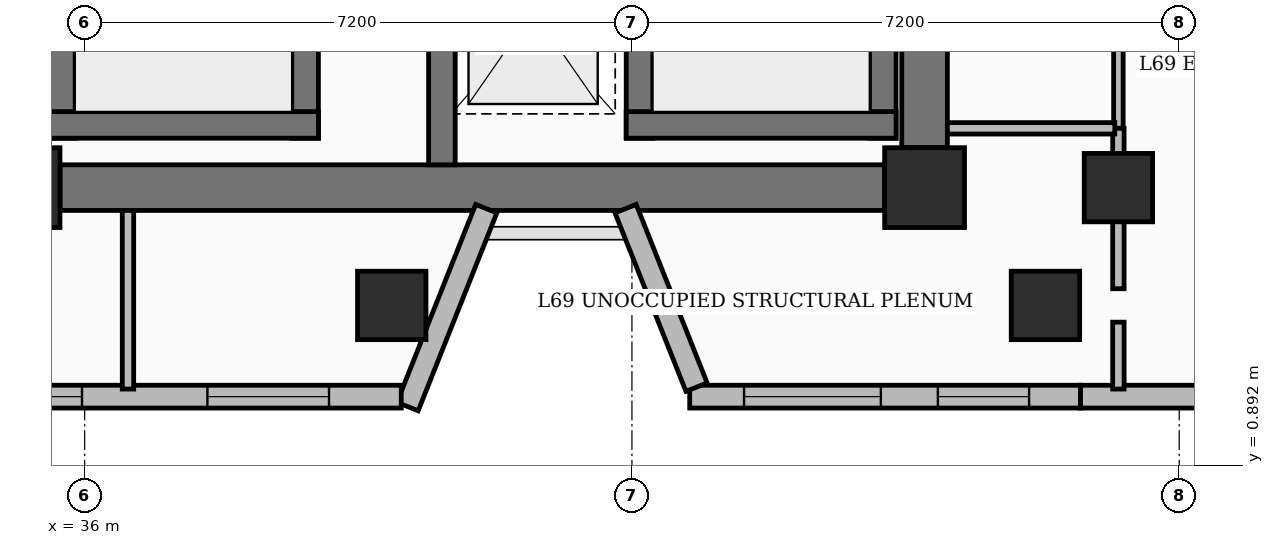
"""IFC4 building model, lengths in metres.
Left out: names, types, materials, properties, quantities, classifications, styles, units other than length and angle.
Written with IfcOpenShell. Run it as: python <this file> out.ifc"""

import sys

from ifc_helpers import new_model, si_unit, direction, frame, frame_2d, origin, origin_2d, place, context, subcontext, project, spatial, rectangle, extrude, element, fill, save


model = new_model("IFC4")
c1 = context("Model", 3, precision=1e-05, world=origin(), true_north=direction((0.0, 1.0)))
c2 = subcontext(c1, "Body", "Model", "MODEL_VIEW")
j1 = project(units=[si_unit("LENGTHUNIT", "METRE"), si_unit("PLANEANGLEUNIT", "RADIAN")], contexts=[c1])
p1 = place(None, origin())
s1 = spatial("IfcSite", under=j1, at=p1, CompositionType="ELEMENT")
p2 = place(p1, origin())
s2 = spatial("IfcBuilding", under=s1, at=p2, CompositionType="ELEMENT")
p3 = place(p2, frame((0.0, 0.0, 267.0)))
s3 = spatial("IfcBuildingStorey", under=s2, at=p3, CompositionType="ELEMENT", Elevation=267.0)
for number, where, z_axis, x_axis in (
    (1, (35.15, 4.55, 0.0), (0.0, 0.0, 1.0), (1.0, 0.0, 0.0)),
    (2, (47.05, 4.55, 0.0), (0.0, 0.0, 1.0), (1.0, 0.0, 0.0)),
):
    element("IfcColumn", number, at=place(p3, frame(where, z_axis=z_axis, x_axis=x_axis)), inside=s3, PredefinedType="COLUMN", context=c2, shape_type="SweptSolid", body=[
        extrude(rectangle(XDim=1.05, YDim=1.05, at=origin_2d()), origin(), (0.0, 0.0, 1.0), 3.75),
    ])
p4 = place(p3, frame((49.6, 4.55, 0.0), z_axis=(0.0, 0.0, 1.0), x_axis=(1.0, 0.0, 0.0)))
e3 = element("IfcColumn", 3, at=p4, inside=s3, PredefinedType="COLUMN", context=c2, shape_type="SweptSolid", body=[
    extrude(rectangle(XDim=0.9, YDim=0.9, at=origin_2d()), origin(), (0.0, 0.0, 1.0), 3.75),
])
p5 = place(p3, frame((35.675, 4.55, 0.0), z_axis=(0.0, 0.0, 1.0), x_axis=(1.0, 0.0, 0.0)))
e4 = element("IfcWall", 4, at=p5, inside=s3, PredefinedType="SHEAR", context=c2, shape_type="SweptSolid", body=[
    extrude(rectangle(XDim=10.85, YDim=0.6, at=frame_2d((5.425, 0.0))), origin(), (0.0, 0.0, 1.0), 3.75),
])
p6 = place(p3, frame((47.05, 5.075, 0.0), z_axis=(0.0, 0.0, 1.0), x_axis=(0.0, 1.0, 0.0)))
e5 = element("IfcWall", 5, at=p6, inside=s3, PredefinedType="SHEAR", context=c2, shape_type="SweptSolid", body=[
    extrude(rectangle(XDim=9.15, YDim=0.6, at=frame_2d((4.575, 0.0))), origin(), (0.0, 0.0, 1.0), 3.75),
])
p7 = place(p3, frame((35.7, 5.2, 0.0), z_axis=(0.0, 0.0, 1.0), x_axis=(0.0, 1.0, 0.0)))
e6 = element("IfcWall", 6, at=p7, inside=s3, PredefinedType="SOLIDWALL", context=c2, shape_type="SweptSolid", body=[
    extrude(rectangle(XDim=9.25, YDim=0.35, at=frame_2d((4.625, 0.0))), origin(), (0.0, 0.0, 1.0), 3.75),
])
p8 = place(p7, frame((6.02, 0.0, 0.0)))
e7 = element("IfcOpeningElement", 7, at=p8, cuts=e6, PredefinedType="OPENING", context=c2, shape_type="SweptSolid", body=[
    extrude(rectangle(XDim=1.0, YDim=2.15, at=frame_2d((0.5, 1.075))), frame((0.0, 0.185, 0.0), z_axis=(0.0, -1.0, 0.0), x_axis=(1.0, 0.0, 0.0)), (0.0, 0.0, 1.0), 0.37),
])
p9 = place(p3, frame((38.9, 5.2, 0.0), z_axis=(0.0, 0.0, 1.0), x_axis=(0.0, 1.0, 0.0)))
e8 = element("IfcWall", 8, at=p9, inside=s3, PredefinedType="SOLIDWALL", context=c2, shape_type="SweptSolid", body=[
    extrude(rectangle(XDim=9.25, YDim=0.35, at=frame_2d((4.625, 0.0))), origin(), (0.0, 0.0, 1.0), 3.75),
])
p10 = place(p9, frame((6.02, 0.0, 0.0)))
e9 = element("IfcOpeningElement", 9, at=p10, cuts=e8, PredefinedType="OPENING", context=c2, shape_type="SweptSolid", body=[
    extrude(rectangle(XDim=1.0, YDim=2.15, at=frame_2d((0.5, 1.075))), frame((0.0, 0.185, 0.0), z_axis=(0.0, -1.0, 0.0), x_axis=(1.0, 0.0, 0.0)), (0.0, 0.0, 1.0), 0.37),
])
p11 = place(p3, frame((35.525, 5.375, 0.0), z_axis=(0.0, 0.0, 1.0), x_axis=(1.0, 0.0, 0.0)))
e10 = element("IfcWall", 10, at=p11, inside=s3, PredefinedType="SOLIDWALL", context=c2, shape_type="SweptSolid", body=[
    extrude(rectangle(XDim=3.55, YDim=0.35, at=frame_2d((1.775, 0.0))), origin(), (0.0, 0.0, 1.0), 3.75),
])
p12 = place(p3, frame((43.3, 5.2, 0.0), z_axis=(0.0, 0.0, 1.0), x_axis=(0.0, 1.0, 0.0)))
e11 = element("IfcWall", 11, at=p12, inside=s3, PredefinedType="SOLIDWALL", context=c2, shape_type="SweptSolid", body=[
    extrude(rectangle(XDim=9.25, YDim=0.35, at=frame_2d((4.625, 0.0))), origin(), (0.0, 0.0, 1.0), 3.75),
])
p13 = place(p12, frame((6.02, 0.0, 0.0)))
e12 = element("IfcOpeningElement", 12, at=p13, cuts=e11, PredefinedType="OPENING", context=c2, shape_type="SweptSolid", body=[
    extrude(rectangle(XDim=1.0, YDim=2.15, at=frame_2d((0.5, 1.075))), frame((0.0, 0.185, 0.0), z_axis=(0.0, -1.0, 0.0), x_axis=(1.0, 0.0, 0.0)), (0.0, 0.0, 1.0), 0.37),
])
p14 = place(p3, frame((46.5, 5.2, 0.0), z_axis=(0.0, 0.0, 1.0), x_axis=(0.0, 1.0, 0.0)))
e13 = element("IfcWall", 13, at=p14, inside=s3, PredefinedType="SOLIDWALL", context=c2, shape_type="SweptSolid", body=[
    extrude(rectangle(XDim=9.25, YDim=0.35, at=frame_2d((4.625, 0.0))), origin(), (0.0, 0.0, 1.0), 3.75),
])
p15 = place(p3, frame((43.125, 5.375, 0.0), z_axis=(0.0, 0.0, 1.0), x_axis=(1.0, 0.0, 0.0)))
e14 = element("IfcWall", 14, at=p15, inside=s3, PredefinedType="SOLIDWALL", context=c2, shape_type="SweptSolid", body=[
    extrude(rectangle(XDim=3.55, YDim=0.35, at=frame_2d((1.775, 0.0))), origin(), (0.0, 0.0, 1.0), 3.75),
])
p16 = place(p3, frame((40.7, 4.85, 0.0), z_axis=(0.0, 0.0, 1.0), x_axis=(0.0, 1.0, 0.0)))
e15 = element("IfcWall", 15, at=p16, inside=s3, PredefinedType="SOLIDWALL", context=c2, shape_type="SweptSolid", body=[
    extrude(rectangle(XDim=3.075, YDim=0.35, at=frame_2d((1.538, 0.0))), origin(), (0.0, 0.0, 1.0), 3.75),
])
for number, where, z_axis, x_axis in (
    (16, (40.04, 3.0, 0.0), (0.0, 0.0, 1.0), (1.0, 0.0, 0.0)),
    (17, (48.64, 3.0, 0.0), (0.0, 0.0, 1.0), (1.0, 0.0, 0.0)),
):
    element("IfcColumn", number, at=place(p3, frame(where, z_axis=z_axis, x_axis=x_axis)), inside=s3, PredefinedType="COLUMN", context=c2, shape_type="SweptSolid", body=[
        extrude(rectangle(XDim=0.9, YDim=0.9, at=origin_2d()), origin(), (0.0, 0.0, 1.0), 3.75),
    ])
p17 = place(p3, frame((53.68, 1.8, 0.0), z_axis=(0.0, 0.0, 1.0), x_axis=(-1.0, 0.0, 0.0)))
e18 = element("IfcWall", 18, at=p17, inside=s3, PredefinedType="SOLIDWALL", context=c2, shape_type="SweptSolid", body=[
    extrude(rectangle(XDim=4.58, YDim=0.3, at=frame_2d((2.29, 0.0))), origin(), (0.0, 0.0, 1.0), 3.5),
])
p18 = place(p17, frame((1.615, 0.0, 0.8)))
e19 = element("IfcOpeningElement", 19, at=p18, cuts=e18, PredefinedType="OPENING", context=c2, shape_type="SweptSolid", body=[
    extrude(rectangle(XDim=1.2, YDim=1.8, at=frame_2d((0.6, 0.9))), frame((0.0, 0.16, 0.0), z_axis=(0.0, -1.0, 0.0), x_axis=(1.0, 0.0, 0.0)), (0.0, 0.0, 1.0), 0.32),
])
p19 = place(p3, frame((49.1, 1.8, 0.0), z_axis=(0.0, 0.0, 1.0), x_axis=(-1.0, 0.0, 0.0)))
e20 = element("IfcWall", 20, at=p19, inside=s3, PredefinedType="SOLIDWALL", context=c2, shape_type="SweptSolid", body=[
    extrude(rectangle(XDim=5.14, YDim=0.3, at=frame_2d((2.57, 0.0))), origin(), (0.0, 0.0, 1.0), 3.5),
])
p20 = place(p19, frame((2.625, 0.0, 0.6)))
e21 = element("IfcOpeningElement", 21, at=p20, cuts=e20, PredefinedType="OPENING", context=c2, shape_type="SweptSolid", body=[
    extrude(rectangle(XDim=1.8, YDim=2.1, at=frame_2d((0.9, 1.05))), frame((0.0, 0.16, 0.0), z_axis=(0.0, -1.0, 0.0), x_axis=(1.0, 0.0, 0.0)), (0.0, 0.0, 1.0), 0.32),
])
p21 = place(p19, frame((0.675, 0.0, 0.8)))
e22 = element("IfcOpeningElement", 22, at=p21, cuts=e20, PredefinedType="OPENING", context=c2, shape_type="SweptSolid", body=[
    extrude(rectangle(XDim=1.2, YDim=1.8, at=frame_2d((0.6, 0.9))), frame((0.0, 0.16, 0.0), z_axis=(0.0, -1.0, 0.0), x_axis=(1.0, 0.0, 0.0)), (0.0, 0.0, 1.0), 0.32),
])
p22 = place(p3, frame((44.05, 1.925, 0.0), z_axis=(0.0, 0.0, 1.0), x_axis=(-0.369457562636, 0.929247603931, 0.0)))
e23 = element("IfcWall", 23, at=p22, inside=s3, PredefinedType="SOLIDWALL", context=c2, shape_type="SweptSolid", body=[
    extrude(rectangle(XDim=2.527, YDim=0.3, at=frame_2d((1.263, 0.0))), origin(), (0.0, 0.0, 1.0), 2.3),
])
p23 = place(p3, frame((41.284, 4.273, 0.0), z_axis=(0.0, 0.0, 1.0), x_axis=(-0.369542065233, -0.929214002275, 0.0)))
e24 = element("IfcWall", 24, at=p23, inside=s3, PredefinedType="SOLIDWALL", context=c2, shape_type="SweptSolid", body=[
    extrude(rectangle(XDim=2.802, YDim=0.3, at=frame_2d((1.401, 0.0))), origin(), (0.0, 0.0, 1.0), 2.3),
])
p24 = place(p3, frame((40.165, 1.8, 0.0), z_axis=(0.0, 0.0, 1.0), x_axis=(-1.0, 0.0, 0.0)))
e25 = element("IfcWall", 25, at=p24, inside=s3, PredefinedType="SOLIDWALL", context=c2, shape_type="SweptSolid", body=[
    extrude(rectangle(XDim=6.885, YDim=0.3, at=frame_2d((3.442, 0.0))), origin(), (0.0, 0.0, 1.0), 3.5),
])
p25 = place(p24, frame((4.2, 0.0, 0.55)))
e26 = element("IfcOpeningElement", 26, at=p25, cuts=e25, PredefinedType="OPENING", context=c2, shape_type="SweptSolid", body=[
    extrude(rectangle(XDim=1.6, YDim=2.2, at=frame_2d((0.8, 1.1))), frame((0.0, 0.16, 0.0), z_axis=(0.0, -1.0, 0.0), x_axis=(1.0, 0.0, 0.0)), (0.0, 0.0, 1.0), 0.32),
])
p26 = place(p24, frame((0.95, 0.0, 0.55)))
e27 = element("IfcOpeningElement", 27, at=p26, cuts=e25, PredefinedType="OPENING", context=c2, shape_type="SweptSolid", body=[
    extrude(rectangle(XDim=1.6, YDim=2.2, at=frame_2d((0.8, 1.1))), frame((0.0, 0.16, 0.0), z_axis=(0.0, -1.0, 0.0), x_axis=(1.0, 0.0, 0.0)), (0.0, 0.0, 1.0), 0.32),
])
p27 = place(p3, frame((36.57, 1.9, 0.0), z_axis=(0.0, 0.0, 1.0), x_axis=(0.0, 1.0, 0.0)))
e28 = element("IfcWall", 28, at=p27, inside=s3, PredefinedType="PARTITIONING", context=c2, shape_type="SweptSolid", body=[
    extrude(rectangle(XDim=2.35, YDim=0.15, at=frame_2d((1.175, 0.0))), origin(), (0.0, 0.0, 1.0), 1.27),
])
p28 = place(p3, frame((49.6, 9.98, 0.0), z_axis=(0.0, 0.0, 1.0), x_axis=(0.0, -1.0, 0.0)))
e29 = element("IfcWall", 29, at=p28, inside=s3, PredefinedType="PARTITIONING", context=c2, shape_type="SweptSolid", body=[
    extrude(rectangle(XDim=4.65, YDim=0.125, at=frame_2d((2.325, 0.0))), origin(), (0.0, 0.0, 1.0), 1.27),
])
p29 = place(p3, frame((49.6, 2.78, 0.0), z_axis=(0.0, 0.0, 1.0), x_axis=(0.0, -1.0, 0.0)))
e30 = element("IfcWall", 30, at=p29, inside=s3, PredefinedType="PARTITIONING", context=c2, shape_type="SweptSolid", body=[
    extrude(rectangle(XDim=0.88, YDim=0.15, at=frame_2d((0.44, 0.0))), origin(), (0.0, 0.0, 1.0), 3.5),
])
p30 = place(p3, frame((49.6, 5.33, 0.0), z_axis=(0.0, 0.0, 1.0), x_axis=(0.0, -1.0, 0.0)))
e31 = element("IfcWall", 31, at=p30, inside=s3, PredefinedType="PARTITIONING", context=c2, shape_type="SweptSolid", body=[
    extrude(rectangle(XDim=2.11, YDim=0.15, at=frame_2d((1.055, 0.0))), origin(), (0.0, 0.0, 1.0), 2.82),
])
p31 = place(p3, frame((47.35, 5.33, 0.0), z_axis=(0.0, 0.0, 1.0), x_axis=(1.0, 0.0, 0.0)))
e32 = element("IfcWall", 32, at=p31, inside=s3, PredefinedType="PARTITIONING", context=c2, shape_type="SweptSolid", body=[
    extrude(rectangle(XDim=2.202, YDim=0.15, at=frame_2d((1.101, 0.0))), origin(), (0.0, 0.0, 1.0), 2.685),
])
p32 = place(p20, origin())
e33 = element("IfcWindow", 33, at=p32, inside=s3, PartitioningType="SINGLE_PANEL", PredefinedType="WINDOW", context=c2, shape_type="SweptSolid", body=[
    extrude(rectangle(XDim=1.8, YDim=2.1, at=frame_2d((0.9, 1.05))), frame((0.0, 0.03, 0.0), z_axis=(0.0, -1.0, 0.0), x_axis=(1.0, 0.0, 0.0)), (0.0, 0.0, 1.0), 0.06),
])
fill(e21, e33)
p33 = place(p21, origin())
e34 = element("IfcWindow", 34, at=p33, inside=s3, PartitioningType="SINGLE_PANEL", PredefinedType="WINDOW", context=c2, shape_type="SweptSolid", body=[
    extrude(rectangle(XDim=1.2, YDim=1.8, at=frame_2d((0.6, 0.9))), frame((0.0, 0.03, 0.0), z_axis=(0.0, -1.0, 0.0), x_axis=(1.0, 0.0, 0.0)), (0.0, 0.0, 1.0), 0.06),
])
fill(e22, e34)
p34 = place(p25, origin())
e35 = element("IfcWindow", 35, at=p34, inside=s3, PartitioningType="SINGLE_PANEL", PredefinedType="WINDOW", context=c2, shape_type="SweptSolid", body=[
    extrude(rectangle(XDim=1.6, YDim=2.2, at=frame_2d((0.8, 1.1))), frame((0.0, 0.03, 0.0), z_axis=(0.0, -1.0, 0.0), x_axis=(1.0, 0.0, 0.0)), (0.0, 0.0, 1.0), 0.06),
])
fill(e26, e35)
p35 = place(p26, origin())
e36 = element("IfcWindow", 36, at=p35, inside=s3, PartitioningType="SINGLE_PANEL", PredefinedType="WINDOW", context=c2, shape_type="SweptSolid", body=[
    extrude(rectangle(XDim=1.6, YDim=2.2, at=frame_2d((0.8, 1.1))), frame((0.0, 0.03, 0.0), z_axis=(0.0, -1.0, 0.0), x_axis=(1.0, 0.0, 0.0)), (0.0, 0.0, 1.0), 0.06),
])
fill(e27, e36)
save(model, sys.argv[1])
